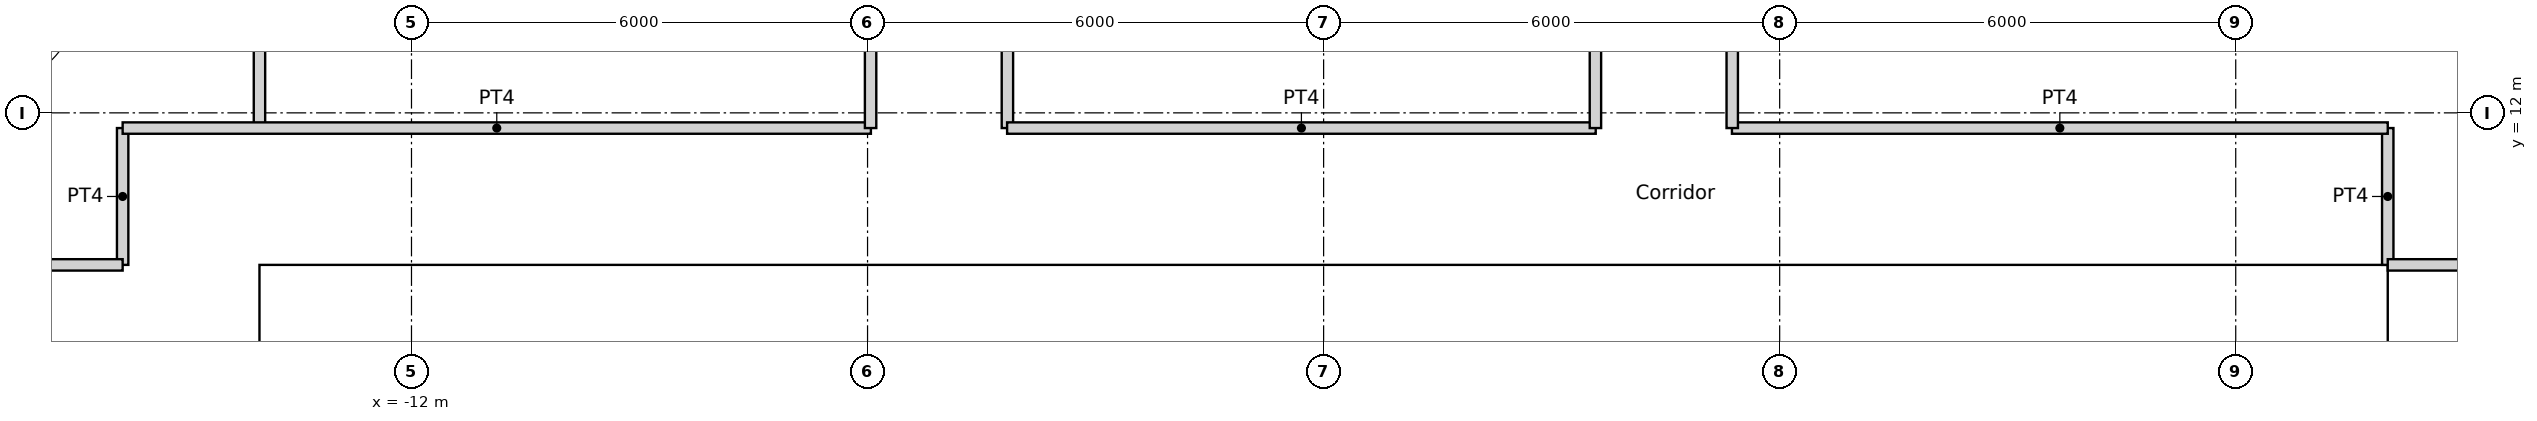
"""IFC4 building model, lengths in metres.
Left out: names, types, materials, properties, quantities, classifications, styles, units other than length and angle.
Written with IfcOpenShell. Run it as: python <this file> out.ifc"""

import sys

from ifc_helpers import new_model, si_unit, direction, frame, frame_2d, origin, origin_2d, place, context, subcontext, project, spatial, rectangle, circle, extrude, element, fill, save


model = new_model("IFC4")
c1 = context("Model", 3, precision=1e-05, world=origin(), true_north=direction((0.0, 1.0)))
c2 = subcontext(c1, "Body", "Model", "MODEL_VIEW")
j1 = project(units=[si_unit("LENGTHUNIT", "METRE"), si_unit("PLANEANGLEUNIT", "RADIAN")], contexts=[c1])
p1 = place(None, origin())
s1 = spatial("IfcSite", under=j1, at=p1, CompositionType="ELEMENT")
p2 = place(p1, origin())
s2 = spatial("IfcBuilding", under=s1, at=p2, CompositionType="ELEMENT")
p3 = place(p2, frame((0.0, 0.0, 82.2)))
s3 = spatial("IfcBuildingStorey", under=s2, at=p3, CompositionType="ELEMENT", Elevation=82.2)
for number, where, z_axis, x_axis in (
    (1, (15.552, 10.603, 0.0), (0.0, 0.0, 1.0), (1.0, 0.0, 0.0)),
    (2, (-13.798, 12.802, 0.0), (0.0, 0.0, 1.0), (1.0, 0.0, 0.0)),
):
    element("IfcColumn", number, at=place(p3, frame(where, z_axis=z_axis, x_axis=x_axis)), inside=s3, PredefinedType="COLUMN", context=c2, shape_type="SweptSolid", body=[
        extrude(circle(Radius=0.7, at=origin_2d()), origin(), (0.0, 0.0, 1.0), 3.6),
    ])
p4 = place(p3, frame((-14.0, 9.4, 0.0), z_axis=(0.0, 0.0, 1.0), x_axis=(1.0, 0.0, 0.0)))
e3 = element("IfcWall", 3, at=p4, inside=s3, PredefinedType="SOLIDWALL", context=c2, shape_type="SweptSolid", body=[
    extrude(rectangle(XDim=28.0, YDim=1.2, at=frame_2d((14.0, 0.0))), origin(), (0.0, 0.0, 1.0), 3.6),
])
p5 = place(p4, frame((9.8, 0.0, 0.0)))
e4 = element("IfcOpeningElement", 4, at=p5, cuts=e3, PredefinedType="OPENING", context=c2, shape_type="SweptSolid", body=[
    extrude(rectangle(XDim=1.8, YDim=2.1, at=frame_2d((0.9, 1.05))), frame((0.0, 0.6, 0.0), z_axis=(0.0, -1.0, 0.0), x_axis=(1.0, 0.0, 0.0)), (0.0, 0.0, 1.0), 1.2),
])
p6 = place(p3, frame((-15.8, 11.8, 0.0), z_axis=(0.0, 0.0, 1.0), x_axis=(1.0, 0.0, 0.0)))
e5 = element("IfcWall", 5, at=p6, inside=s3, PredefinedType="PARTITIONING", context=c2, shape_type="SweptSolid", body=[
    extrude(rectangle(XDim=9.844, YDim=0.15, at=frame_2d((4.922, 0.0))), origin(), (0.0, 0.0, 1.0), 3.15),
])
p7 = place(p3, frame((-4.164, 11.8, 0.0), z_axis=(0.0, 0.0, 1.0), x_axis=(1.0, 0.0, 0.0)))
e6 = element("IfcWall", 6, at=p7, inside=s3, PredefinedType="PARTITIONING", context=c2, shape_type="SweptSolid", body=[
    extrude(rectangle(XDim=7.744, YDim=0.15, at=frame_2d((3.872, 0.0))), origin(), (0.0, 0.0, 1.0), 3.15),
])
p8 = place(p3, frame((5.372, 11.8, 0.0), z_axis=(0.0, 0.0, 1.0), x_axis=(1.0, 0.0, 0.0)))
e7 = element("IfcWall", 7, at=p8, inside=s3, PredefinedType="PARTITIONING", context=c2, shape_type="SweptSolid", body=[
    extrude(rectangle(XDim=8.628, YDim=0.15, at=frame_2d((4.314, 0.0))), origin(), (0.0, 0.0, 1.0), 3.15),
])
for number, where, z_axis, x_axis in (
    (8, (14.0, 10.0, 0.0), (0.0, 0.0, 1.0), (0.0, 1.0, 0.0)),
    (9, (-15.8, 10.0, 0.0), (0.0, 0.0, 1.0), (0.0, 1.0, 0.0)),
):
    element("IfcWall", number, at=place(p3, frame(where, z_axis=z_axis, x_axis=x_axis)), inside=s3, PredefinedType="PARTITIONING", context=c2, shape_type="SweptSolid", body=[
        extrude(rectangle(XDim=1.8, YDim=0.15, at=frame_2d((0.9, 0.0))), origin(), (0.0, 0.0, 1.0), 3.15),
    ])
p9 = place(p3, frame((14.0, 10.0, 0.0), z_axis=(0.0, 0.0, 1.0), x_axis=(1.0, 0.0, 0.0)))
e10 = element("IfcWall", 10, at=p9, inside=s3, PredefinedType="PARTITIONING", context=c2, shape_type="SweptSolid", body=[
    extrude(rectangle(XDim=5.401, YDim=0.15, at=frame_2d((2.7, 0.0))), origin(), (0.0, 0.0, 1.0), 3.15),
])
p10 = place(p3, frame((-5.96, 11.8, 0.0), z_axis=(0.0, 0.0, 1.0), x_axis=(0.0, 1.0, 0.0)))
e11 = element("IfcWall", 11, at=p10, inside=s3, PredefinedType="PARTITIONING", context=c2, shape_type="SweptSolid", body=[
    extrude(rectangle(XDim=9.934, YDim=0.15, at=frame_2d((4.967, 0.0))), origin(), (0.0, 0.0, 1.0), 3.15),
])
p11 = place(p10, frame((4.467, 0.0, 0.0)))
e12 = element("IfcOpeningElement", 12, at=p11, cuts=e11, PredefinedType="OPENING", context=c2, shape_type="SweptSolid", body=[
    extrude(rectangle(XDim=1.0, YDim=2.04, at=frame_2d((0.5, 1.02))), frame((0.0, 0.075, 0.0), z_axis=(0.0, -1.0, 0.0), x_axis=(1.0, 0.0, 0.0)), (0.0, 0.0, 1.0), 0.15),
])
p12 = place(p3, frame((3.576, 11.8, 0.0), z_axis=(0.0, 0.0, 1.0), x_axis=(0.0, 1.0, 0.0)))
e13 = element("IfcWall", 13, at=p12, inside=s3, PredefinedType="PARTITIONING", context=c2, shape_type="SweptSolid", body=[
    extrude(rectangle(XDim=10.002, YDim=0.15, at=frame_2d((5.001, 0.0))), origin(), (0.0, 0.0, 1.0), 3.15),
])
p13 = place(p12, frame((4.501, 0.0, 0.0)))
e14 = element("IfcOpeningElement", 14, at=p13, cuts=e13, PredefinedType="OPENING", context=c2, shape_type="SweptSolid", body=[
    extrude(rectangle(XDim=1.0, YDim=2.04, at=frame_2d((0.5, 1.02))), frame((0.0, 0.075, 0.0), z_axis=(0.0, -1.0, 0.0), x_axis=(1.0, 0.0, 0.0)), (0.0, 0.0, 1.0), 0.15),
])
for number, where, z_axis, x_axis in (
    (15, (-4.16, 11.8, 0.0), (0.0, 0.0, 1.0), (0.0, 1.0, 0.0)),
    (16, (5.376, 11.8, 0.0), (0.0, 0.0, 1.0), (0.0, 1.0, 0.0)),
):
    element("IfcWall", number, at=place(p3, frame(where, z_axis=z_axis, x_axis=x_axis)), inside=s3, PredefinedType="PARTITIONING", context=c2, shape_type="SweptSolid", body=[
        extrude(rectangle(XDim=10.002, YDim=0.15, at=frame_2d((5.001, 0.0))), origin(), (0.0, 0.0, 1.0), 3.15),
    ])
p14 = place(p3, frame((-19.401, 10.0, 0.0), z_axis=(0.0, 0.0, 1.0), x_axis=(0.499992689227, 0.86602962462, 0.0)))
e17 = element("IfcWall", 17, at=p14, inside=s3, PredefinedType="PARTITIONING", context=c2, shape_type="SweptSolid", body=[
    extrude(rectangle(XDim=6.882, YDim=0.15, at=frame_2d((3.441, 0.0))), origin(), (0.0, 0.0, 1.0), 3.15),
])
p15 = place(p14, frame((2.941, 0.0, 0.0)))
e18 = element("IfcOpeningElement", 18, at=p15, cuts=e17, PredefinedType="OPENING", context=c2, shape_type="SweptSolid", body=[
    extrude(rectangle(XDim=1.0, YDim=2.04, at=frame_2d((0.5, 1.02))), frame((0.0, 0.075, 0.0), z_axis=(0.0, -1.0, 0.0), x_axis=(1.0, 0.0, 0.0)), (0.0, 0.0, 1.0), 0.15),
])
p16 = place(p3, frame((-19.401, 10.0, 0.0), z_axis=(0.0, 0.0, 1.0), x_axis=(1.0, 0.0, 0.0)))
e19 = element("IfcWall", 19, at=p16, inside=s3, PredefinedType="PARTITIONING", context=c2, shape_type="SweptSolid", body=[
    extrude(rectangle(XDim=3.601, YDim=0.15, at=frame_2d((1.8, 0.0))), origin(), (0.0, 0.0, 1.0), 3.15),
])
p17 = place(p3, frame((-14.0, 11.8, 0.0), z_axis=(0.0, 0.0, 1.0), x_axis=(0.0, 1.0, 0.0)))
e20 = element("IfcWall", 20, at=p17, inside=s3, PredefinedType="PARTITIONING", context=c2, shape_type="SweptSolid", body=[
    extrude(rectangle(XDim=5.292, YDim=0.15, at=frame_2d((2.646, 0.0))), origin(), (0.0, 0.0, 1.0), 3.15),
])
p18 = place(p5, origin())
e21 = element("IfcDoor", 21, at=p18, inside=s3, OperationType="DOUBLE_DOOR_SINGLE_SWING", PredefinedType="DOOR", context=c2, shape_type="SweptSolid", body=[
    extrude(rectangle(XDim=1.8, YDim=2.1, at=frame_2d((0.9, 1.05))), frame((0.0, 0.025, 0.0), z_axis=(0.0, -1.0, 0.0), x_axis=(1.0, 0.0, 0.0)), (0.0, 0.0, 1.0), 0.05),
])
fill(e4, e21)
save(model, sys.argv[1])
